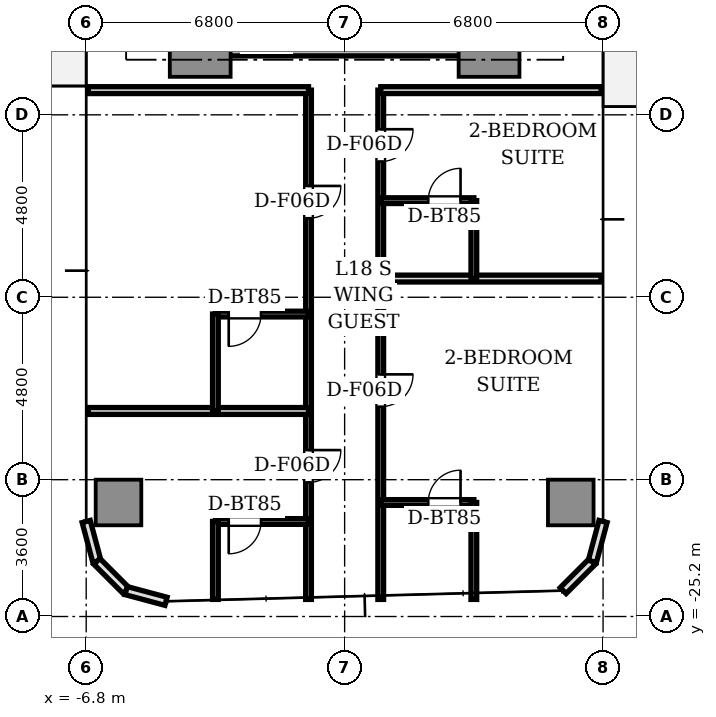
"""IFC4 building model, lengths in metres.
Left out: names, types, materials, properties, quantities, classifications, styles, units other than length and angle.
Written with IfcOpenShell. Run it as: python <this file> out.ifc"""

import sys

from ifc_helpers import new_model, si_unit, direction, frame, frame_2d, origin, origin_2d, place, context, subcontext, project, spatial, rectangle, extrude, source, transform, mapped, element, fill, save


model = new_model("IFC4")
c1 = context("Model", 3, precision=1e-05, world=origin(), true_north=direction((0.0, 1.0)))
c2 = subcontext(c1, "Body", "Model", "MODEL_VIEW")
j1 = project(units=[si_unit("LENGTHUNIT", "METRE"), si_unit("PLANEANGLEUNIT", "RADIAN")], contexts=[c1])
p1 = place(None, origin())
s1 = spatial("IfcSite", under=j1, at=p1, CompositionType="ELEMENT")
p2 = place(p1, origin())
s2 = spatial("IfcBuilding", under=s1, at=p2, CompositionType="ELEMENT")
p3 = place(p2, frame((0.0, 0.0, 67.8)))
s3 = spatial("IfcBuildingStorey", under=s2, at=p3, CompositionType="ELEMENT", Elevation=67.8)
p4 = place(p3, frame((-3.55, -10.2, 0.0), z_axis=(0.0, 0.0, 1.0), x_axis=(1.0, 0.0, 0.0)))
e1 = element("IfcWall", 1, at=p4, inside=s3, PredefinedType="SHEAR", context=c2, shape_type="SweptSolid", body=[
    extrude(rectangle(XDim=7.1, YDim=0.5, at=frame_2d((3.55, 0.0))), origin(), (0.0, 0.0, 1.0), 3.11),
])
m1 = source(origin(), c2, "Body", "SweptSolid", [
    extrude(rectangle(XDim=1.6, YDim=1.6, at=origin_2d()), origin(), (0.0, 0.0, 1.0), 3.11),
])
for number, where, z_axis, x_axis in (
    (2, (-3.8, -10.2, 0.0), (0.0, 0.0, 1.0), (1.0, 0.0, 0.0)),
    (3, (3.8, -10.2, 0.0), (0.0, 0.0, 1.0), (1.0, 0.0, 0.0)),
):
    element("IfcColumn", number, at=place(p3, frame(where, z_axis=z_axis, x_axis=x_axis)), inside=s3, PredefinedType="COLUMN", context=c2, shape_type="MappedRepresentation", body=[
        mapped(m1, transform((0.0, 0.0, 0.0), scale=1.0)),
    ])
m2 = source(origin(), c2, "Body", "SweptSolid", [
    extrude(rectangle(XDim=1.2, YDim=1.2, at=origin_2d()), origin(), (0.0, 0.0, 1.0), 3.11),
])
for number, where, z_axis, x_axis in (
    (4, (-5.95, -22.2, 0.0), (0.0, 0.0, 1.0), (1.0, 0.0, 0.0)),
    (5, (5.95, -22.2, 0.0), (0.0, 0.0, 1.0), (1.0, 0.0, 0.0)),
):
    element("IfcColumn", number, at=place(p3, frame(where, z_axis=z_axis, x_axis=x_axis)), inside=s3, PredefinedType="COLUMN", context=c2, shape_type="MappedRepresentation", body=[
        mapped(m2, transform((0.0, 0.0, 0.0), scale=1.0)),
    ])
for number, where, z_axis, x_axis in (
    (6, (-6.8, -22.7, 0.0), (0.0, 0.0, 1.0), (0.259, -0.966, 0.0)),
    (7, (-6.519, -23.75, 0.0), (0.0, 0.0, 1.0), (0.707, -0.707, 0.0)),
    (8, (-5.75, -24.519, 0.0), (0.0, 0.0, 1.0), (0.966, -0.259, 0.0)),
    (9, (5.75, -24.519, 0.0), (0.0, 0.0, 1.0), (0.707, 0.707, 0.0)),
    (10, (6.519, -23.75, 0.0), (0.0, 0.0, 1.0), (0.259, 0.966, 0.0)),
):
    element("IfcWall", number, at=place(p3, frame(where, z_axis=z_axis, x_axis=x_axis)), inside=s3, PredefinedType="STANDARD", context=c2, shape_type="SweptSolid", body=[
        extrude(rectangle(XDim=1.087, YDim=0.22, at=frame_2d((0.543, 0.0))), origin(), (0.0, 0.0, 1.0), 3.11),
    ])
p5 = place(p3, frame((0.95, -11.35, 0.0), z_axis=(0.0, 0.0, 1.0), x_axis=(0.0, -1.0, 0.0)))
e11 = element("IfcWall", 11, at=p5, inside=s3, PredefinedType="PARTITIONING", context=c2, shape_type="SweptSolid", body=[
    extrude(rectangle(XDim=13.4, YDim=0.15, at=frame_2d((6.7, 0.0))), origin(), (0.0, 0.0, 1.0), 2.66),
])
p6 = place(p5, frame((1.029, 0.0, 0.0)))
e12 = element("IfcOpeningElement", 12, at=p6, cuts=e11, PredefinedType="OPENING", context=c2, shape_type="SweptSolid", body=[
    extrude(rectangle(XDim=0.85, YDim=2.1, at=frame_2d((0.425, 1.05))), frame((0.0, 0.085, 0.0), z_axis=(0.0, -1.0, 0.0), x_axis=(1.0, 0.0, 0.0)), (0.0, 0.0, 1.0), 0.17),
])
p7 = place(p5, frame((7.479, 0.0, 0.0)))
e13 = element("IfcOpeningElement", 13, at=p7, cuts=e11, PredefinedType="OPENING", context=c2, shape_type="SweptSolid", body=[
    extrude(rectangle(XDim=0.85, YDim=2.1, at=frame_2d((0.425, 1.05))), frame((0.0, 0.085, 0.0), z_axis=(0.0, -1.0, 0.0), x_axis=(1.0, 0.0, 0.0)), (0.0, 0.0, 1.0), 0.17),
])
p8 = place(p3, frame((-0.95, -11.35, 0.0), z_axis=(0.0, 0.0, 1.0), x_axis=(0.0, -1.0, 0.0)))
e14 = element("IfcWall", 14, at=p8, inside=s3, PredefinedType="PARTITIONING", context=c2, shape_type="SweptSolid", body=[
    extrude(rectangle(XDim=13.4, YDim=0.15, at=frame_2d((6.7, 0.0))), origin(), (0.0, 0.0, 1.0), 2.66),
])
p9 = place(p8, frame((2.521, 0.0, 0.0)))
e15 = element("IfcOpeningElement", 15, at=p9, cuts=e14, PredefinedType="OPENING", context=c2, shape_type="SweptSolid", body=[
    extrude(rectangle(XDim=0.85, YDim=2.1, at=frame_2d((0.425, 1.05))), frame((0.0, 0.085, 0.0), z_axis=(0.0, -1.0, 0.0), x_axis=(1.0, 0.0, 0.0)), (0.0, 0.0, 1.0), 0.17),
])
p10 = place(p8, frame((9.471, 0.0, 0.0)))
e16 = element("IfcOpeningElement", 16, at=p10, cuts=e14, PredefinedType="OPENING", context=c2, shape_type="SweptSolid", body=[
    extrude(rectangle(XDim=0.85, YDim=2.1, at=frame_2d((0.425, 1.05))), frame((0.0, 0.085, 0.0), z_axis=(0.0, -1.0, 0.0), x_axis=(1.0, 0.0, 0.0)), (0.0, 0.0, 1.0), 0.17),
])
for number, where, z_axis, x_axis in (
    (17, (0.95, -11.35, 0.0), (0.0, 0.0, 1.0), (1.0, 0.0, 0.0)),
    (18, (-6.75, -11.35, 0.0), (0.0, 0.0, 1.0), (1.0, 0.0, 0.0)),
    (19, (0.95, -16.308, 0.0), (0.0, 0.0, 1.0), (1.0, 0.0, 0.0)),
):
    element("IfcWall", number, at=place(p3, frame(where, z_axis=z_axis, x_axis=x_axis)), inside=s3, PredefinedType="PARTITIONING", context=c2, shape_type="SweptSolid", body=[
        extrude(rectangle(XDim=5.8, YDim=0.18, at=frame_2d((2.9, 0.0))), origin(), (0.0, 0.0, 1.0), 2.66),
    ])
p11 = place(p3, frame((0.95, -14.258, 0.0), z_axis=(0.0, 0.0, 1.0), x_axis=(1.0, 0.0, 0.0)))
e20 = element("IfcWall", 20, at=p11, inside=s3, PredefinedType="PARTITIONING", context=c2, shape_type="SweptSolid", body=[
    extrude(rectangle(XDim=2.45, YDim=0.15, at=frame_2d((1.225, 0.0))), origin(), (0.0, 0.0, 1.0), 2.66),
])
p12 = place(p11, frame((1.25, 0.0, 0.0)))
e21 = element("IfcOpeningElement", 21, at=p12, cuts=e20, PredefinedType="OPENING", context=c2, shape_type="SweptSolid", body=[
    extrude(rectangle(XDim=0.85, YDim=2.1, at=frame_2d((0.425, 1.05))), frame((0.0, 0.085, 0.0), z_axis=(0.0, -1.0, 0.0), x_axis=(1.0, 0.0, 0.0)), (0.0, 0.0, 1.0), 0.17),
])
p13 = place(p3, frame((3.4, -14.258, 0.0), z_axis=(0.0, 0.0, 1.0), x_axis=(0.0, -1.0, 0.0)))
e22 = element("IfcWall", 22, at=p13, inside=s3, PredefinedType="PARTITIONING", context=c2, shape_type="SweptSolid", body=[
    extrude(rectangle(XDim=2.05, YDim=0.15, at=frame_2d((1.025, 0.0))), origin(), (0.0, 0.0, 1.0), 2.66),
])
p14 = place(p3, frame((0.95, -22.2, 0.0), z_axis=(0.0, 0.0, 1.0), x_axis=(1.0, 0.0, 0.0)))
e23 = element("IfcWall", 23, at=p14, inside=s3, PredefinedType="PARTITIONING", context=c2, shape_type="SweptSolid", body=[
    extrude(rectangle(XDim=2.45, YDim=0.15, at=frame_2d((1.225, 0.0))), origin(), (0.0, 0.0, 1.0), 2.58),
])
p15 = place(p14, frame((1.25, 0.0, 0.0)))
e24 = element("IfcOpeningElement", 24, at=p15, cuts=e23, PredefinedType="OPENING", context=c2, shape_type="SweptSolid", body=[
    extrude(rectangle(XDim=0.85, YDim=2.1, at=frame_2d((0.425, 1.05))), frame((0.0, 0.085, 0.0), z_axis=(0.0, -1.0, 0.0), x_axis=(1.0, 0.0, 0.0)), (0.0, 0.0, 1.0), 0.17),
])
p16 = place(p3, frame((3.4, -22.2, 0.0), z_axis=(0.0, 0.0, 1.0), x_axis=(0.0, -1.0, 0.0)))
e25 = element("IfcWall", 25, at=p16, inside=s3, PredefinedType="PARTITIONING", context=c2, shape_type="SweptSolid", body=[
    extrude(rectangle(XDim=2.55, YDim=0.15, at=frame_2d((1.275, 0.0))), origin(), (0.0, 0.0, 1.0), 2.66),
])
p17 = place(p3, frame((-0.95, -19.792, 0.0), z_axis=(0.0, 0.0, 1.0), x_axis=(-1.0, 0.0, 0.0)))
e26 = element("IfcWall", 26, at=p17, inside=s3, PredefinedType="PARTITIONING", context=c2, shape_type="SweptSolid", body=[
    extrude(rectangle(XDim=5.8, YDim=0.18, at=frame_2d((2.9, 0.0))), origin(), (0.0, 0.0, 1.0), 2.66),
])
p18 = place(p3, frame((-0.95, -17.242, 0.0), z_axis=(0.0, 0.0, 1.0), x_axis=(-1.0, 0.0, 0.0)))
e27 = element("IfcWall", 27, at=p18, inside=s3, PredefinedType="PARTITIONING", context=c2, shape_type="SweptSolid", body=[
    extrude(rectangle(XDim=2.45, YDim=0.15, at=frame_2d((1.225, 0.0))), origin(), (0.0, 0.0, 1.0), 2.66),
])
p19 = place(p18, frame((1.25, 0.0, 0.0)))
e28 = element("IfcOpeningElement", 28, at=p19, cuts=e27, PredefinedType="OPENING", context=c2, shape_type="SweptSolid", body=[
    extrude(rectangle(XDim=0.85, YDim=2.1, at=frame_2d((0.425, 1.05))), frame((0.0, 0.085, 0.0), z_axis=(0.0, -1.0, 0.0), x_axis=(1.0, 0.0, 0.0)), (0.0, 0.0, 1.0), 0.17),
])
p20 = place(p3, frame((-3.4, -17.242, 0.0), z_axis=(0.0, 0.0, 1.0), x_axis=(0.0, -1.0, 0.0)))
e29 = element("IfcWall", 29, at=p20, inside=s3, PredefinedType="PARTITIONING", context=c2, shape_type="SweptSolid", body=[
    extrude(rectangle(XDim=2.55, YDim=0.15, at=frame_2d((1.275, 0.0))), origin(), (0.0, 0.0, 1.0), 2.66),
])
p21 = place(p3, frame((-0.95, -22.7, 0.0), z_axis=(0.0, 0.0, 1.0), x_axis=(-1.0, 0.0, 0.0)))
e30 = element("IfcWall", 30, at=p21, inside=s3, PredefinedType="PARTITIONING", context=c2, shape_type="SweptSolid", body=[
    extrude(rectangle(XDim=2.45, YDim=0.15, at=frame_2d((1.225, 0.0))), origin(), (0.0, 0.0, 1.0), 2.66),
])
p22 = place(p21, frame((1.25, 0.0, 0.0)))
e31 = element("IfcOpeningElement", 31, at=p22, cuts=e30, PredefinedType="OPENING", context=c2, shape_type="SweptSolid", body=[
    extrude(rectangle(XDim=0.85, YDim=2.1, at=frame_2d((0.425, 1.05))), frame((0.0, 0.085, 0.0), z_axis=(0.0, -1.0, 0.0), x_axis=(1.0, 0.0, 0.0)), (0.0, 0.0, 1.0), 0.17),
])
p23 = place(p3, frame((-3.4, -22.7, 0.0), z_axis=(0.0, 0.0, 1.0), x_axis=(0.0, -1.0, 0.0)))
e32 = element("IfcWall", 32, at=p23, inside=s3, PredefinedType="PARTITIONING", context=c2, shape_type="SweptSolid", body=[
    extrude(rectangle(XDim=2.05, YDim=0.15, at=frame_2d((1.025, 0.0))), origin(), (0.0, 0.0, 1.0), 2.66),
])
m3 = source(origin(), c2, "Body", "SweptSolid", [
    extrude(rectangle(XDim=0.85, YDim=0.05, at=origin_2d()), origin(), (0.0, 0.0, 1.0), 2.1),
])
p24 = place(p12, frame((0.425, 0.0, 0.0)))
e33 = element("IfcDoor", 33, at=p24, inside=s3, OperationType="SINGLE_SWING_RIGHT", PredefinedType="DOOR", context=c2, shape_type="MappedRepresentation", body=[
    mapped(m3, transform((0.0, 0.0, 0.0), scale=1.0)),
])
fill(e21, e33)
p25 = place(p6, frame((0.425, 0.0, 0.0)))
e34 = element("IfcDoor", 34, at=p25, inside=s3, OperationType="SINGLE_SWING_LEFT", PredefinedType="DOOR", context=c2, shape_type="MappedRepresentation", body=[
    mapped(m3, transform((0.0, 0.0, 0.0), scale=1.0)),
])
fill(e12, e34)
p26 = place(p15, frame((0.425, 0.0, 0.0)))
e35 = element("IfcDoor", 35, at=p26, inside=s3, OperationType="SINGLE_SWING_RIGHT", PredefinedType="DOOR", context=c2, shape_type="MappedRepresentation", body=[
    mapped(m3, transform((0.0, 0.0, 0.0), scale=1.0)),
])
fill(e24, e35)
p27 = place(p7, frame((0.425, 0.0, 0.0)))
e36 = element("IfcDoor", 36, at=p27, inside=s3, OperationType="SINGLE_SWING_LEFT", PredefinedType="DOOR", context=c2, shape_type="MappedRepresentation", body=[
    mapped(m3, transform((0.0, 0.0, 0.0), scale=1.0)),
])
fill(e13, e36)
p28 = place(p19, frame((0.425, 0.0, 0.0)))
e37 = element("IfcDoor", 37, at=p28, inside=s3, OperationType="SINGLE_SWING_RIGHT", PredefinedType="DOOR", context=c2, shape_type="MappedRepresentation", body=[
    mapped(m3, transform((0.0, 0.0, 0.0), scale=1.0)),
])
fill(e28, e37)
p29 = place(p9, frame((0.425, 0.0, 0.0)))
e38 = element("IfcDoor", 38, at=p29, inside=s3, OperationType="SINGLE_SWING_LEFT", PredefinedType="DOOR", context=c2, shape_type="MappedRepresentation", body=[
    mapped(m3, transform((0.0, 0.0, 0.0), scale=1.0)),
])
fill(e15, e38)
p30 = place(p22, frame((0.425, 0.0, 0.0)))
e39 = element("IfcDoor", 39, at=p30, inside=s3, OperationType="SINGLE_SWING_RIGHT", PredefinedType="DOOR", context=c2, shape_type="MappedRepresentation", body=[
    mapped(m3, transform((0.0, 0.0, 0.0), scale=1.0)),
])
fill(e31, e39)
p31 = place(p10, frame((0.425, 0.0, 0.0)))
e40 = element("IfcDoor", 40, at=p31, inside=s3, OperationType="SINGLE_SWING_LEFT", PredefinedType="DOOR", context=c2, shape_type="MappedRepresentation", body=[
    mapped(m3, transform((0.0, 0.0, 0.0), scale=1.0)),
])
fill(e16, e40)
save(model, sys.argv[1])
